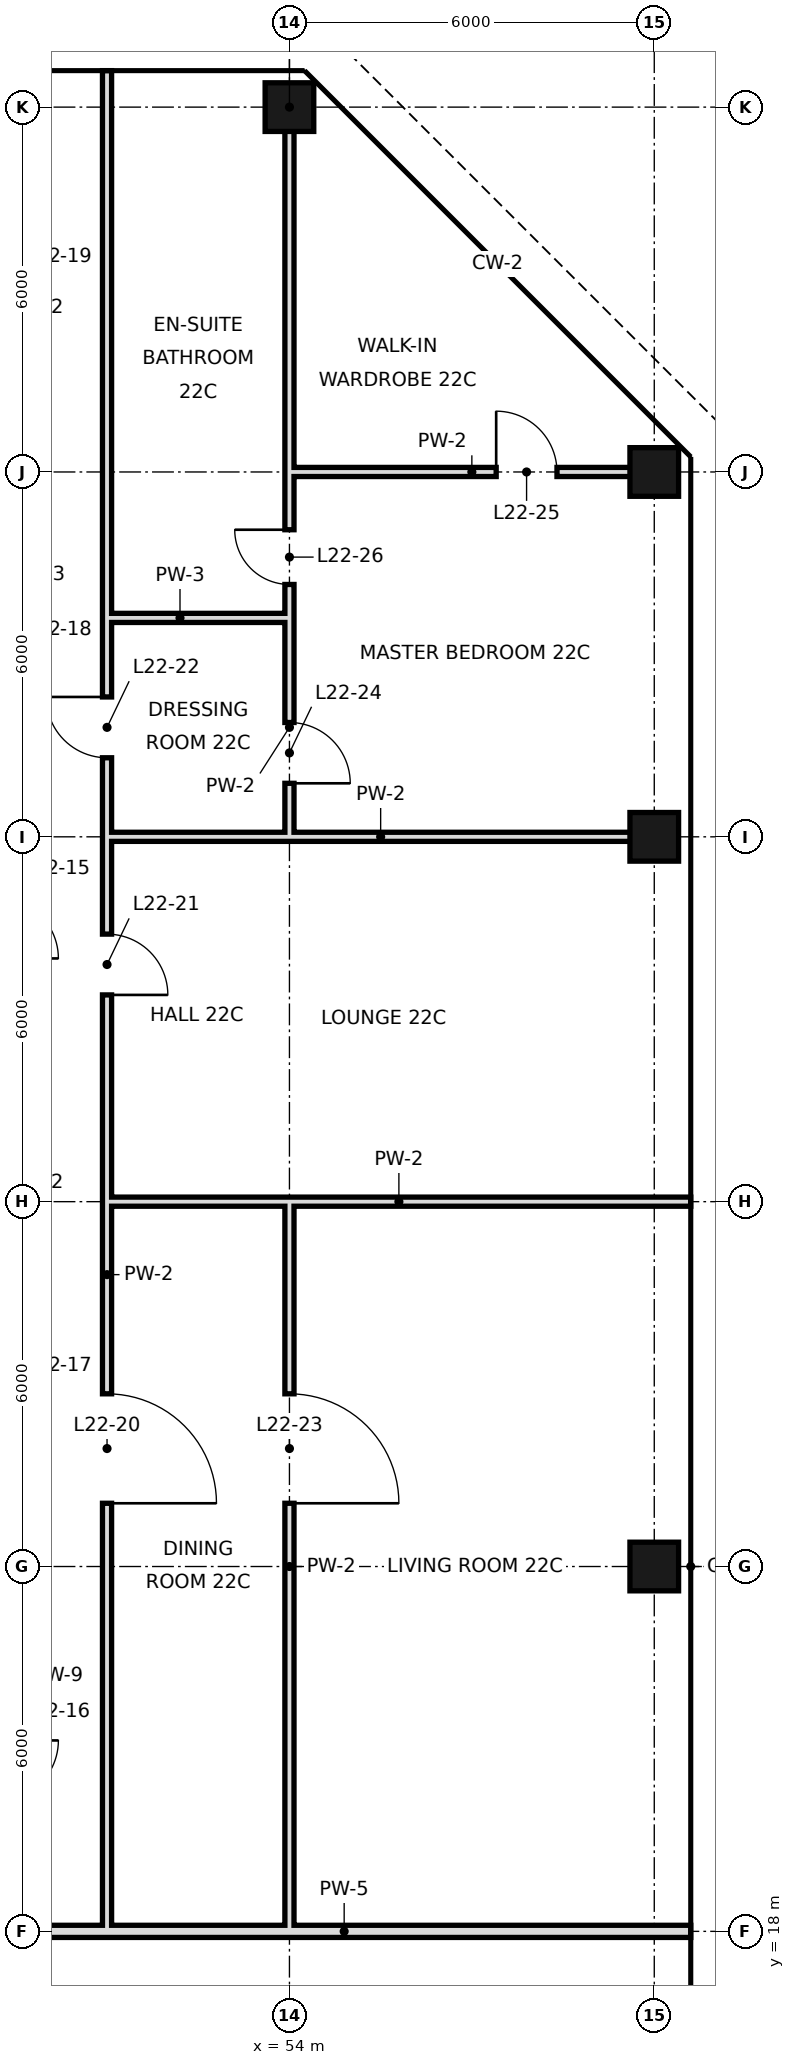
"""IFC4 building model, lengths in metres.
Left out: names, types, materials, properties, quantities, classifications, styles, units other than length and angle.
Written with IfcOpenShell. Run it as: python <this file> out.ifc"""

import sys

from ifc_helpers import new_model, si_unit, direction, frame, frame_2d, origin, origin_2d, place, context, subcontext, project, spatial, rectangle, hollow_rectangle, extrude, element, fill, save


model = new_model("IFC4")
c1 = context("Model", 3, precision=1e-05, world=origin(), true_north=direction((0.0, 1.0)))
c2 = subcontext(c1, "Body", "Model", "MODEL_VIEW")
j1 = project(units=[si_unit("LENGTHUNIT", "METRE"), si_unit("PLANEANGLEUNIT", "RADIAN")], contexts=[c1])
p1 = place(None, origin())
s1 = spatial("IfcSite", under=j1, at=p1, CompositionType="ELEMENT")
p2 = place(p1, origin())
s2 = spatial("IfcBuilding", under=s1, at=p2, CompositionType="ELEMENT")
p3 = place(p2, frame((0.0, 0.0, 103.4)))
s3 = spatial("IfcBuildingStorey", under=s2, at=p3, CompositionType="ELEMENT", Elevation=103.4)
for number, where, z_axis, x_axis in (
    (1, (54.0, 48.0, 0.0), (0.0, 0.0, 1.0), (1.0, 0.0, 0.0)),
    (2, (60.0, 24.0, 0.0), (0.0, 0.0, 1.0), (1.0, 0.0, 0.0)),
    (3, (60.0, 36.0, 0.0), (0.0, 0.0, 1.0), (1.0, 0.0, 0.0)),
    (4, (60.0, 42.0, 0.0), (0.0, 0.0, 1.0), (1.0, 0.0, 0.0)),
):
    element("IfcColumn", number, at=place(p3, frame(where, z_axis=z_axis, x_axis=x_axis)), inside=s3, PredefinedType="COLUMN", context=c2, shape_type="SweptSolid", body=[
        extrude(hollow_rectangle(XDim=0.8, YDim=0.8, WallThickness=0.04, at=origin_2d()), origin(), (0.0, 0.0, 1.0), 3.6),
    ])
p4 = place(p3, frame((51.0, 18.0, 0.0), z_axis=(0.0, 0.0, 1.0), x_axis=(0.0, 1.0, 0.0)))
e5 = element("IfcWall", 5, at=p4, inside=s3, PredefinedType="PARTITIONING", context=c2, shape_type="SweptSolid", body=[
    extrude(rectangle(XDim=21.6, YDim=0.15, at=frame_2d((10.8, 0.0))), origin(), (0.0, 0.0, 1.0), 3.42),
])
p5 = place(p4, frame((7.04, 0.0, 0.0)))
e6 = element("IfcOpeningElement", 6, at=p5, cuts=e5, PredefinedType="OPENING", context=c2, shape_type="SweptSolid", body=[
    extrude(rectangle(XDim=1.8, YDim=2.4, at=frame_2d((0.9, 1.2))), frame((0.0, 0.085, 0.0), z_axis=(0.0, -1.0, 0.0), x_axis=(1.0, 0.0, 0.0)), (0.0, 0.0, 1.0), 0.17),
])
p6 = place(p4, frame((15.4, 0.0, 0.0)))
e7 = element("IfcOpeningElement", 7, at=p6, cuts=e5, PredefinedType="OPENING", context=c2, shape_type="SweptSolid", body=[
    extrude(rectangle(XDim=1.0, YDim=2.4, at=frame_2d((0.5, 1.2))), frame((0.0, 0.085, 0.0), z_axis=(0.0, -1.0, 0.0), x_axis=(1.0, 0.0, 0.0)), (0.0, 0.0, 1.0), 0.17),
])
p7 = place(p4, frame((19.3, 0.0, 0.0)))
e8 = element("IfcOpeningElement", 8, at=p7, cuts=e5, PredefinedType="OPENING", context=c2, shape_type="SweptSolid", body=[
    extrude(rectangle(XDim=1.0, YDim=2.4, at=frame_2d((0.5, 1.2))), frame((0.0, 0.085, 0.0), z_axis=(0.0, -1.0, 0.0), x_axis=(1.0, 0.0, 0.0)), (0.0, 0.0, 1.0), 0.17),
])
p8 = place(p3, frame((51.0, 39.6, 0.0), z_axis=(0.0, 0.0, 1.0), x_axis=(0.0, 1.0, 0.0)))
e9 = element("IfcWall", 9, at=p8, inside=s3, PredefinedType="PARTITIONING", context=c2, shape_type="SweptSolid", body=[
    extrude(rectangle(XDim=9.0, YDim=0.15, at=frame_2d((4.5, 0.0))), origin(), (0.0, 0.0, 1.0), 3.42),
])
p9 = place(p3, frame((54.0, 18.0, 0.0), z_axis=(0.0, 0.0, 1.0), x_axis=(0.0, 1.0, 0.0)))
e10 = element("IfcWall", 10, at=p9, inside=s3, PredefinedType="PARTITIONING", context=c2, shape_type="SweptSolid", body=[
    extrude(rectangle(XDim=12.0, YDim=0.15, at=frame_2d((6.0, 0.0))), origin(), (0.0, 0.0, 1.0), 3.42),
])
p10 = place(p9, frame((7.04, 0.0, 0.0)))
e11 = element("IfcOpeningElement", 11, at=p10, cuts=e10, PredefinedType="OPENING", context=c2, shape_type="SweptSolid", body=[
    extrude(rectangle(XDim=1.8, YDim=2.4, at=frame_2d((0.9, 1.2))), frame((0.0, 0.085, 0.0), z_axis=(0.0, -1.0, 0.0), x_axis=(1.0, 0.0, 0.0)), (0.0, 0.0, 1.0), 0.17),
])
p11 = place(p3, frame((54.0, 36.0, 0.0), z_axis=(0.0, 0.0, 1.0), x_axis=(0.0, 1.0, 0.0)))
e12 = element("IfcWall", 12, at=p11, inside=s3, PredefinedType="PARTITIONING", context=c2, shape_type="SweptSolid", body=[
    extrude(rectangle(XDim=3.6, YDim=0.15, at=frame_2d((1.8, 0.0))), origin(), (0.0, 0.0, 1.0), 3.42),
])
p12 = place(p11, frame((0.88, 0.0, 0.0)))
e13 = element("IfcOpeningElement", 13, at=p12, cuts=e12, PredefinedType="OPENING", context=c2, shape_type="SweptSolid", body=[
    extrude(rectangle(XDim=1.0, YDim=2.4, at=frame_2d((0.5, 1.2))), frame((0.0, 0.085, 0.0), z_axis=(0.0, -1.0, 0.0), x_axis=(1.0, 0.0, 0.0)), (0.0, 0.0, 1.0), 0.17),
])
p13 = place(p3, frame((54.0, 39.6, 0.0), z_axis=(0.0, 0.0, 1.0), x_axis=(0.0, 1.0, 0.0)))
e14 = element("IfcWall", 14, at=p13, inside=s3, PredefinedType="PARTITIONING", context=c2, shape_type="SweptSolid", body=[
    extrude(rectangle(XDim=8.4, YDim=0.15, at=frame_2d((4.2, 0.0))), origin(), (0.0, 0.0, 1.0), 3.42),
])
p14 = place(p13, frame((0.55, 0.0, 0.0)))
e15 = element("IfcOpeningElement", 15, at=p14, cuts=e14, PredefinedType="OPENING", context=c2, shape_type="SweptSolid", body=[
    extrude(rectangle(XDim=0.9, YDim=2.4, at=frame_2d((0.45, 1.2))), frame((0.0, 0.085, 0.0), z_axis=(0.0, -1.0, 0.0), x_axis=(1.0, 0.0, 0.0)), (0.0, 0.0, 1.0), 0.17),
])
p15 = place(p3, frame((49.2, 18.0, 0.0), z_axis=(0.0, 0.0, 1.0), x_axis=(1.0, 0.0, 0.0)))
e16 = element("IfcWall", 16, at=p15, inside=s3, PredefinedType="SOLIDWALL", context=c2, shape_type="SweptSolid", body=[
    extrude(rectangle(XDim=11.4, YDim=0.2, at=frame_2d((5.7, 0.0))), origin(), (0.0, 0.0, 1.0), 2.72),
])
p16 = place(p3, frame((51.0, 30.0, 0.0), z_axis=(0.0, 0.0, 1.0), x_axis=(1.0, 0.0, 0.0)))
e17 = element("IfcWall", 17, at=p16, inside=s3, PredefinedType="PARTITIONING", context=c2, shape_type="SweptSolid", body=[
    extrude(rectangle(XDim=9.6, YDim=0.15, at=frame_2d((4.8, 0.0))), origin(), (0.0, 0.0, 1.0), 2.72),
])
p17 = place(p3, frame((51.0, 36.0, 0.0), z_axis=(0.0, 0.0, 1.0), x_axis=(1.0, 0.0, 0.0)))
e18 = element("IfcWall", 18, at=p17, inside=s3, PredefinedType="PARTITIONING", context=c2, shape_type="SweptSolid", body=[
    extrude(rectangle(XDim=9.0, YDim=0.15, at=frame_2d((4.5, 0.0))), origin(), (0.0, 0.0, 1.0), 2.72),
])
p18 = place(p3, frame((51.0, 39.6, 0.0), z_axis=(0.0, 0.0, 1.0), x_axis=(1.0, 0.0, 0.0)))
e19 = element("IfcWall", 19, at=p18, inside=s3, PredefinedType="PARTITIONING", context=c2, shape_type="SweptSolid", body=[
    extrude(rectangle(XDim=3.0, YDim=0.15, at=frame_2d((1.5, 0.0))), origin(), (0.0, 0.0, 1.0), 3.42),
])
p19 = place(p3, frame((54.0, 42.0, 0.0), z_axis=(0.0, 0.0, 1.0), x_axis=(1.0, 0.0, 0.0)))
e20 = element("IfcWall", 20, at=p19, inside=s3, PredefinedType="PARTITIONING", context=c2, shape_type="SweptSolid", body=[
    extrude(rectangle(XDim=6.0, YDim=0.15, at=frame_2d((3.0, 0.0))), origin(), (0.0, 0.0, 1.0), 2.72),
])
p20 = place(p19, frame((3.4, 0.0, 0.0)))
e21 = element("IfcOpeningElement", 21, at=p20, cuts=e20, PredefinedType="OPENING", context=c2, shape_type="SweptSolid", body=[
    extrude(rectangle(XDim=1.0, YDim=2.4, at=frame_2d((0.5, 1.2))), frame((0.0, 0.085, 0.0), z_axis=(0.0, -1.0, 0.0), x_axis=(1.0, 0.0, 0.0)), (0.0, 0.0, 1.0), 0.17),
])
p21 = place(p5, frame((1.8, 0.0, 0.0), z_axis=(0.0, 0.0, 1.0), x_axis=(-1.0, 0.0, 0.0)))
e22 = element("IfcDoor", 22, at=p21, inside=s3, OperationType="SINGLE_SWING_RIGHT", PredefinedType="DOOR", context=c2, shape_type="SweptSolid", body=[
    extrude(rectangle(XDim=1.8, YDim=2.4, at=frame_2d((0.9, 1.2))), frame((0.0, 0.025, 0.0), z_axis=(0.0, -1.0, 0.0), x_axis=(1.0, 0.0, 0.0)), (0.0, 0.0, 1.0), 0.05),
])
fill(e6, e22)
p22 = place(p6, frame((1.0, 0.0, 0.0), z_axis=(0.0, 0.0, 1.0), x_axis=(-1.0, 0.0, 0.0)))
e23 = element("IfcDoor", 23, at=p22, inside=s3, OperationType="SINGLE_SWING_RIGHT", PredefinedType="DOOR", context=c2, shape_type="SweptSolid", body=[
    extrude(rectangle(XDim=1.0, YDim=2.4, at=frame_2d((0.5, 1.2))), frame((0.0, 0.025, 0.0), z_axis=(0.0, -1.0, 0.0), x_axis=(1.0, 0.0, 0.0)), (0.0, 0.0, 1.0), 0.05),
])
fill(e7, e23)
p23 = place(p7, frame((1.0, 0.0, 0.0), z_axis=(0.0, 0.0, 1.0), x_axis=(-1.0, 0.0, 0.0)))
e24 = element("IfcDoor", 24, at=p23, inside=s3, OperationType="SINGLE_SWING_LEFT", PredefinedType="DOOR", context=c2, shape_type="SweptSolid", body=[
    extrude(rectangle(XDim=1.0, YDim=2.4, at=frame_2d((0.5, 1.2))), frame((0.0, 0.025, 0.0), z_axis=(0.0, -1.0, 0.0), x_axis=(1.0, 0.0, 0.0)), (0.0, 0.0, 1.0), 0.05),
])
fill(e8, e24)
p24 = place(p10, frame((1.8, 0.0, 0.0), z_axis=(0.0, 0.0, 1.0), x_axis=(-1.0, 0.0, 0.0)))
e25 = element("IfcDoor", 25, at=p24, inside=s3, OperationType="SINGLE_SWING_RIGHT", PredefinedType="DOOR", context=c2, shape_type="SweptSolid", body=[
    extrude(rectangle(XDim=1.8, YDim=2.4, at=frame_2d((0.9, 1.2))), frame((0.0, 0.025, 0.0), z_axis=(0.0, -1.0, 0.0), x_axis=(1.0, 0.0, 0.0)), (0.0, 0.0, 1.0), 0.05),
])
fill(e11, e25)
p25 = place(p12, frame((1.0, 0.0, 0.0), z_axis=(0.0, 0.0, 1.0), x_axis=(-1.0, 0.0, 0.0)))
e26 = element("IfcDoor", 26, at=p25, inside=s3, OperationType="SINGLE_SWING_RIGHT", PredefinedType="DOOR", context=c2, shape_type="SweptSolid", body=[
    extrude(rectangle(XDim=1.0, YDim=2.4, at=frame_2d((0.5, 1.2))), frame((0.0, 0.025, 0.0), z_axis=(0.0, -1.0, 0.0), x_axis=(1.0, 0.0, 0.0)), (0.0, 0.0, 1.0), 0.05),
])
fill(e13, e26)
p26 = place(p20, origin())
e27 = element("IfcDoor", 27, at=p26, inside=s3, OperationType="SINGLE_SWING_LEFT", PredefinedType="DOOR", context=c2, shape_type="SweptSolid", body=[
    extrude(rectangle(XDim=1.0, YDim=2.4, at=frame_2d((0.5, 1.2))), frame((0.0, 0.025, 0.0), z_axis=(0.0, -1.0, 0.0), x_axis=(1.0, 0.0, 0.0)), (0.0, 0.0, 1.0), 0.05),
])
fill(e21, e27)
p27 = place(p14, frame((0.9, 0.0, 0.0), z_axis=(0.0, 0.0, 1.0), x_axis=(-1.0, 0.0, 0.0)))
e28 = element("IfcDoor", 28, at=p27, inside=s3, OperationType="SINGLE_SWING_LEFT", PredefinedType="DOOR", context=c2, shape_type="SweptSolid", body=[
    extrude(rectangle(XDim=0.9, YDim=2.4, at=frame_2d((0.45, 1.2))), frame((0.0, 0.025, 0.0), z_axis=(0.0, -1.0, 0.0), x_axis=(1.0, 0.0, 0.0)), (0.0, 0.0, 1.0), 0.05),
])
fill(e15, e28)
save(model, sys.argv[1])
